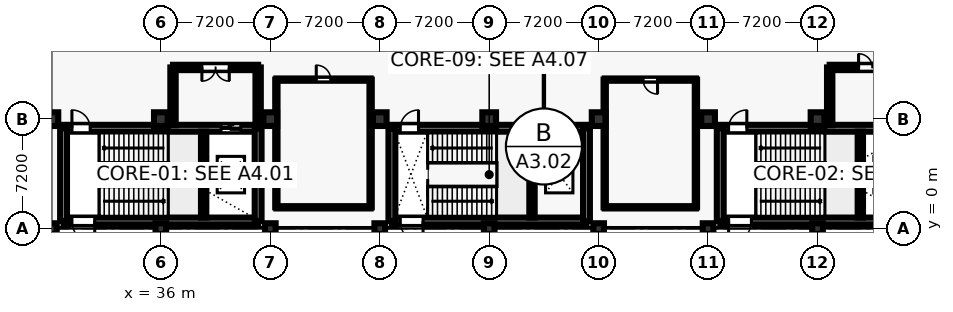
"""IFC4 building model, lengths in metres.
Left out: names, types, materials, properties, quantities, classifications, styles, units other than length and angle.
Written with IfcOpenShell. Run it as: python <this file> out.ifc"""

import sys

from ifc_helpers import new_model, si_unit, direction, frame, frame_2d, origin, origin_2d, place, context, subcontext, project, spatial, rectangle, extrude, element, fill, save


model = new_model("IFC4")
c1 = context("Model", 3, precision=1e-05, world=origin(), true_north=direction((0.0, 1.0)))
c2 = subcontext(c1, "Body", "Model", "MODEL_VIEW")
j1 = project(units=[si_unit("LENGTHUNIT", "METRE"), si_unit("PLANEANGLEUNIT", "RADIAN")], contexts=[c1])
p1 = place(None, origin())
s1 = spatial("IfcSite", under=j1, at=p1, CompositionType="ELEMENT")
p2 = place(p1, origin())
s2 = spatial("IfcBuilding", under=s1, at=p2, CompositionType="ELEMENT")
p3 = place(p2, origin())
s3 = spatial("IfcBuildingStorey", under=s2, at=p3, CompositionType="ELEMENT", Elevation=0.0)
p4 = place(p3, frame((28.8, 0.0, 0.0), z_axis=(0.0, 0.0, 1.0), x_axis=(1.0, 0.0, 0.0)))
e1 = element("IfcColumn", 1, at=p4, inside=s3, PredefinedType="COLUMN", context=c2, shape_type="SweptSolid", body=[
    extrude(rectangle(XDim=0.7, YDim=0.7, at=origin_2d()), origin(), (0.0, 0.0, 1.0), 5.4),
])
p5 = place(p3, frame((28.8, 7.2, 0.0), z_axis=(0.0, 0.0, 1.0), x_axis=(1.0, 0.0, 0.0)))
e2 = element("IfcColumn", 2, at=p5, inside=s3, PredefinedType="COLUMN", context=c2, shape_type="SweptSolid", body=[
    extrude(rectangle(XDim=0.9, YDim=0.9, at=origin_2d()), origin(), (0.0, 0.0, 1.0), 5.4),
])
p6 = place(p3, frame((36.0, 0.0, 0.0), z_axis=(0.0, 0.0, 1.0), x_axis=(1.0, 0.0, 0.0)))
e3 = element("IfcColumn", 3, at=p6, inside=s3, PredefinedType="COLUMN", context=c2, shape_type="SweptSolid", body=[
    extrude(rectangle(XDim=0.7, YDim=0.7, at=origin_2d()), origin(), (0.0, 0.0, 1.0), 5.4),
])
p7 = place(p3, frame((36.0, 7.2, 0.0), z_axis=(0.0, 0.0, 1.0), x_axis=(1.0, 0.0, 0.0)))
e4 = element("IfcColumn", 4, at=p7, inside=s3, PredefinedType="COLUMN", context=c2, shape_type="SweptSolid", body=[
    extrude(rectangle(XDim=0.9, YDim=0.9, at=origin_2d()), origin(), (0.0, 0.0, 1.0), 5.4),
])
p8 = place(p3, frame((43.2, 0.0, 0.0), z_axis=(0.0, 0.0, 1.0), x_axis=(1.0, 0.0, 0.0)))
e5 = element("IfcColumn", 5, at=p8, inside=s3, PredefinedType="COLUMN", context=c2, shape_type="SweptSolid", body=[
    extrude(rectangle(XDim=0.7, YDim=0.7, at=origin_2d()), origin(), (0.0, 0.0, 1.0), 5.4),
])
p9 = place(p3, frame((43.2, 7.2, 0.0), z_axis=(0.0, 0.0, 1.0), x_axis=(1.0, 0.0, 0.0)))
e6 = element("IfcColumn", 6, at=p9, inside=s3, PredefinedType="COLUMN", context=c2, shape_type="SweptSolid", body=[
    extrude(rectangle(XDim=0.9, YDim=0.9, at=origin_2d()), origin(), (0.0, 0.0, 1.0), 5.4),
])
p10 = place(p3, frame((50.4, 0.0, 0.0), z_axis=(0.0, 0.0, 1.0), x_axis=(1.0, 0.0, 0.0)))
e7 = element("IfcColumn", 7, at=p10, inside=s3, PredefinedType="COLUMN", context=c2, shape_type="SweptSolid", body=[
    extrude(rectangle(XDim=0.7, YDim=0.7, at=origin_2d()), origin(), (0.0, 0.0, 1.0), 5.4),
])
p11 = place(p3, frame((50.4, 7.2, 0.0), z_axis=(0.0, 0.0, 1.0), x_axis=(1.0, 0.0, 0.0)))
e8 = element("IfcColumn", 8, at=p11, inside=s3, PredefinedType="COLUMN", context=c2, shape_type="SweptSolid", body=[
    extrude(rectangle(XDim=0.9, YDim=0.9, at=origin_2d()), origin(), (0.0, 0.0, 1.0), 5.4),
])
p12 = place(p3, frame((57.6, 0.0, 0.0), z_axis=(0.0, 0.0, 1.0), x_axis=(1.0, 0.0, 0.0)))
e9 = element("IfcColumn", 9, at=p12, inside=s3, PredefinedType="COLUMN", context=c2, shape_type="SweptSolid", body=[
    extrude(rectangle(XDim=0.7, YDim=0.7, at=origin_2d()), origin(), (0.0, 0.0, 1.0), 5.4),
])
p13 = place(p3, frame((57.6, 7.2, 0.0), z_axis=(0.0, 0.0, 1.0), x_axis=(1.0, 0.0, 0.0)))
e10 = element("IfcColumn", 10, at=p13, inside=s3, PredefinedType="COLUMN", context=c2, shape_type="SweptSolid", body=[
    extrude(rectangle(XDim=0.9, YDim=0.9, at=origin_2d()), origin(), (0.0, 0.0, 1.0), 5.4),
])
p14 = place(p3, frame((64.8, 0.0, 0.0), z_axis=(0.0, 0.0, 1.0), x_axis=(1.0, 0.0, 0.0)))
e11 = element("IfcColumn", 11, at=p14, inside=s3, PredefinedType="COLUMN", context=c2, shape_type="SweptSolid", body=[
    extrude(rectangle(XDim=0.7, YDim=0.7, at=origin_2d()), origin(), (0.0, 0.0, 1.0), 5.4),
])
p15 = place(p3, frame((64.8, 7.2, 0.0), z_axis=(0.0, 0.0, 1.0), x_axis=(1.0, 0.0, 0.0)))
e12 = element("IfcColumn", 12, at=p15, inside=s3, PredefinedType="COLUMN", context=c2, shape_type="SweptSolid", body=[
    extrude(rectangle(XDim=0.9, YDim=0.9, at=origin_2d()), origin(), (0.0, 0.0, 1.0), 5.4),
])
p16 = place(p3, frame((72.0, 0.0, 0.0), z_axis=(0.0, 0.0, 1.0), x_axis=(1.0, 0.0, 0.0)))
e13 = element("IfcColumn", 13, at=p16, inside=s3, PredefinedType="COLUMN", context=c2, shape_type="SweptSolid", body=[
    extrude(rectangle(XDim=0.7, YDim=0.7, at=origin_2d()), origin(), (0.0, 0.0, 1.0), 5.4),
])
p17 = place(p3, frame((72.0, 7.2, 0.0), z_axis=(0.0, 0.0, 1.0), x_axis=(1.0, 0.0, 0.0)))
e14 = element("IfcColumn", 14, at=p17, inside=s3, PredefinedType="COLUMN", context=c2, shape_type="SweptSolid", body=[
    extrude(rectangle(XDim=0.9, YDim=0.9, at=origin_2d()), origin(), (0.0, 0.0, 1.0), 5.4),
])
p18 = place(p3, frame((79.2, 0.0, 0.0), z_axis=(0.0, 0.0, 1.0), x_axis=(1.0, 0.0, 0.0)))
e15 = element("IfcColumn", 15, at=p18, inside=s3, PredefinedType="COLUMN", context=c2, shape_type="SweptSolid", body=[
    extrude(rectangle(XDim=0.7, YDim=0.7, at=origin_2d()), origin(), (0.0, 0.0, 1.0), 5.4),
])
p19 = place(p3, frame((79.2, 7.2, 0.0), z_axis=(0.0, 0.0, 1.0), x_axis=(1.0, 0.0, 0.0)))
e16 = element("IfcColumn", 16, at=p19, inside=s3, PredefinedType="COLUMN", context=c2, shape_type="SweptSolid", body=[
    extrude(rectangle(XDim=0.9, YDim=0.9, at=origin_2d()), origin(), (0.0, 0.0, 1.0), 5.4),
])
p20 = place(p3, frame((29.6, 0.5, 0.0), z_axis=(0.0, 0.0, 1.0), x_axis=(1.0, 0.0, 0.0)))
e17 = element("IfcWall", 17, at=p20, inside=s3, PredefinedType="SHEAR", context=c2, shape_type="SweptSolid", body=[
    extrude(rectangle(XDim=12.8, YDim=0.45, at=frame_2d((6.4, 0.0))), origin(), (0.0, 0.0, 1.0), 5.06),
])
p21 = place(p20, frame((0.55, 0.0, 0.0)))
e18 = element("IfcOpeningElement", 18, at=p21, cuts=e17, PredefinedType="OPENING", context=c2, shape_type="SweptSolid", body=[
    extrude(rectangle(XDim=1.5, YDim=2.25, at=frame_2d((0.75, 1.125))), frame((0.0, 0.235, 0.0), z_axis=(0.0, -1.0, 0.0), x_axis=(1.0, 0.0, 0.0)), (0.0, 0.0, 1.0), 0.47),
])
p22 = place(p3, frame((29.6, 6.6, 0.0), z_axis=(0.0, 0.0, 1.0), x_axis=(1.0, 0.0, 0.0)))
e19 = element("IfcWall", 19, at=p22, inside=s3, PredefinedType="SHEAR", context=c2, shape_type="SweptSolid", body=[
    extrude(rectangle(XDim=12.8, YDim=0.45, at=frame_2d((6.4, 0.0))), origin(), (0.0, 0.0, 1.0), 5.06),
])
p23 = place(p22, frame((0.55, 0.0, 0.0)))
e20 = element("IfcOpeningElement", 20, at=p23, cuts=e19, PredefinedType="OPENING", context=c2, shape_type="SweptSolid", body=[
    extrude(rectangle(XDim=1.2, YDim=2.25, at=frame_2d((0.6, 1.125))), frame((0.0, 0.235, 0.0), z_axis=(0.0, -1.0, 0.0), x_axis=(1.0, 0.0, 0.0)), (0.0, 0.0, 1.0), 0.47),
])
p24 = place(p22, frame((10.358, 0.0, 0.0)))
e21 = element("IfcOpeningElement", 21, at=p24, cuts=e19, PredefinedType="OPENING", context=c2, shape_type="SweptSolid", body=[
    extrude(rectangle(XDim=1.3, YDim=2.25, at=frame_2d((0.65, 1.125))), frame((0.0, 0.235, 0.0), z_axis=(0.0, -1.0, 0.0), x_axis=(1.0, 0.0, 0.0)), (0.0, 0.0, 1.0), 0.47),
])
for number, where, z_axis, x_axis in (
    (22, (29.6, 0.5, 0.0), (0.0, 0.0, 1.0), (0.0, 1.0, 0.0)),
    (23, (42.4, 0.5, 0.0), (0.0, 0.0, 1.0), (0.0, 1.0, 0.0)),
):
    element("IfcWall", number, at=place(p3, frame(where, z_axis=z_axis, x_axis=x_axis)), inside=s3, PredefinedType="SHEAR", context=c2, shape_type="SweptSolid", body=[
        extrude(rectangle(XDim=6.1, YDim=0.45, at=frame_2d((3.05, 0.0))), origin(), (0.0, 0.0, 1.0), 5.06),
    ])
p25 = place(p3, frame((38.816, 0.725, 0.0), z_axis=(0.0, 0.0, 1.0), x_axis=(0.0, 1.0, 0.0)))
e24 = element("IfcWall", 24, at=p25, inside=s3, PredefinedType="SHEAR", context=c2, shape_type="SweptSolid", body=[
    extrude(rectangle(XDim=5.65, YDim=0.35, at=frame_2d((2.825, 0.0))), origin(), (0.0, 0.0, 1.0), 5.06),
])
p26 = place(p3, frame((72.8, 0.5, 0.0), z_axis=(0.0, 0.0, 1.0), x_axis=(1.0, 0.0, 0.0)))
e25 = element("IfcWall", 25, at=p26, inside=s3, PredefinedType="SHEAR", context=c2, shape_type="SweptSolid", body=[
    extrude(rectangle(XDim=12.8, YDim=0.45, at=frame_2d((6.4, 0.0))), origin(), (0.0, 0.0, 1.0), 5.06),
])
p27 = place(p26, frame((0.55, 0.0, 0.0)))
e26 = element("IfcOpeningElement", 26, at=p27, cuts=e25, PredefinedType="OPENING", context=c2, shape_type="SweptSolid", body=[
    extrude(rectangle(XDim=1.5, YDim=2.25, at=frame_2d((0.75, 1.125))), frame((0.0, 0.235, 0.0), z_axis=(0.0, -1.0, 0.0), x_axis=(1.0, 0.0, 0.0)), (0.0, 0.0, 1.0), 0.47),
])
p28 = place(p3, frame((72.8, 6.6, 0.0), z_axis=(0.0, 0.0, 1.0), x_axis=(1.0, 0.0, 0.0)))
e27 = element("IfcWall", 27, at=p28, inside=s3, PredefinedType="SHEAR", context=c2, shape_type="SweptSolid", body=[
    extrude(rectangle(XDim=12.8, YDim=0.45, at=frame_2d((6.4, 0.0))), origin(), (0.0, 0.0, 1.0), 5.06),
])
p29 = place(p28, frame((0.55, 0.0, 0.0)))
e28 = element("IfcOpeningElement", 28, at=p29, cuts=e27, PredefinedType="OPENING", context=c2, shape_type="SweptSolid", body=[
    extrude(rectangle(XDim=1.2, YDim=2.25, at=frame_2d((0.6, 1.125))), frame((0.0, 0.235, 0.0), z_axis=(0.0, -1.0, 0.0), x_axis=(1.0, 0.0, 0.0)), (0.0, 0.0, 1.0), 0.47),
])
p30 = place(p28, frame((10.358, 0.0, 0.0)))
e29 = element("IfcOpeningElement", 29, at=p30, cuts=e27, PredefinedType="OPENING", context=c2, shape_type="SweptSolid", body=[
    extrude(rectangle(XDim=1.3, YDim=2.25, at=frame_2d((0.65, 1.125))), frame((0.0, 0.235, 0.0), z_axis=(0.0, -1.0, 0.0), x_axis=(1.0, 0.0, 0.0)), (0.0, 0.0, 1.0), 0.47),
])
p31 = place(p3, frame((72.8, 0.5, 0.0), z_axis=(0.0, 0.0, 1.0), x_axis=(0.0, 1.0, 0.0)))
e30 = element("IfcWall", 30, at=p31, inside=s3, PredefinedType="SHEAR", context=c2, shape_type="SweptSolid", body=[
    extrude(rectangle(XDim=6.1, YDim=0.45, at=frame_2d((3.05, 0.0))), origin(), (0.0, 0.0, 1.0), 5.06),
])
p32 = place(p3, frame((82.016, 0.725, 0.0), z_axis=(0.0, 0.0, 1.0), x_axis=(0.0, 1.0, 0.0)))
e31 = element("IfcWall", 31, at=p32, inside=s3, PredefinedType="SHEAR", context=c2, shape_type="SweptSolid", body=[
    extrude(rectangle(XDim=5.65, YDim=0.35, at=frame_2d((2.825, 0.0))), origin(), (0.0, 0.0, 1.0), 5.06),
])
p33 = place(p3, frame((51.2, 0.5, 0.0), z_axis=(0.0, 0.0, 1.0), x_axis=(1.0, 0.0, 0.0)))
e32 = element("IfcWall", 32, at=p33, inside=s3, PredefinedType="SHEAR", context=c2, shape_type="SweptSolid", body=[
    extrude(rectangle(XDim=12.8, YDim=0.45, at=frame_2d((6.4, 0.0))), origin(), (0.0, 0.0, 1.0), 5.06),
])
p34 = place(p33, frame((0.55, 0.0, 0.0)))
e33 = element("IfcOpeningElement", 33, at=p34, cuts=e32, PredefinedType="OPENING", context=c2, shape_type="SweptSolid", body=[
    extrude(rectangle(XDim=1.5, YDim=2.25, at=frame_2d((0.75, 1.125))), frame((0.0, 0.235, 0.0), z_axis=(0.0, -1.0, 0.0), x_axis=(1.0, 0.0, 0.0)), (0.0, 0.0, 1.0), 0.47),
])
p35 = place(p3, frame((51.2, 6.6, 0.0), z_axis=(0.0, 0.0, 1.0), x_axis=(1.0, 0.0, 0.0)))
e34 = element("IfcWall", 34, at=p35, inside=s3, PredefinedType="SHEAR", context=c2, shape_type="SweptSolid", body=[
    extrude(rectangle(XDim=12.8, YDim=0.45, at=frame_2d((6.4, 0.0))), origin(), (0.0, 0.0, 1.0), 5.06),
])
p36 = place(p35, frame((0.55, 0.0, 0.0)))
e35 = element("IfcOpeningElement", 35, at=p36, cuts=e34, PredefinedType="OPENING", context=c2, shape_type="SweptSolid", body=[
    extrude(rectangle(XDim=1.2, YDim=2.25, at=frame_2d((0.6, 1.125))), frame((0.0, 0.235, 0.0), z_axis=(0.0, -1.0, 0.0), x_axis=(1.0, 0.0, 0.0)), (0.0, 0.0, 1.0), 0.47),
])
p37 = place(p35, frame((10.458, 0.0, 0.0)))
e36 = element("IfcOpeningElement", 36, at=p37, cuts=e34, PredefinedType="OPENING", context=c2, shape_type="SweptSolid", body=[
    extrude(rectangle(XDim=1.1, YDim=2.2, at=frame_2d((0.55, 1.1))), frame((0.0, 0.235, 0.0), z_axis=(0.0, -1.0, 0.0), x_axis=(1.0, 0.0, 0.0)), (0.0, 0.0, 1.0), 0.47),
])
for number, where, z_axis, x_axis in (
    (37, (51.2, 0.5, 0.0), (0.0, 0.0, 1.0), (0.0, 1.0, 0.0)),
    (38, (64.0, 0.5, 0.0), (0.0, 0.0, 1.0), (0.0, 1.0, 0.0)),
):
    element("IfcWall", number, at=place(p3, frame(where, z_axis=z_axis, x_axis=x_axis)), inside=s3, PredefinedType="SHEAR", context=c2, shape_type="SweptSolid", body=[
        extrude(rectangle(XDim=6.1, YDim=0.45, at=frame_2d((3.05, 0.0))), origin(), (0.0, 0.0, 1.0), 5.06),
    ])
p38 = place(p3, frame((60.416, 0.725, 0.0), z_axis=(0.0, 0.0, 1.0), x_axis=(0.0, 1.0, 0.0)))
e39 = element("IfcWall", 39, at=p38, inside=s3, PredefinedType="SHEAR", context=c2, shape_type="SweptSolid", body=[
    extrude(rectangle(XDim=5.65, YDim=0.35, at=frame_2d((2.825, 0.0))), origin(), (0.0, 0.0, 1.0), 5.06),
])
p39 = place(p3, frame((42.4, 6.8, 0.0), z_axis=(0.0, 0.0, 1.0), x_axis=(0.0, 1.0, 0.0)))
e40 = element("IfcWall", 40, at=p39, inside=s3, PredefinedType="SHEAR", context=c2, shape_type="SweptSolid", body=[
    extrude(rectangle(XDim=3.8, YDim=0.35, at=frame_2d((1.9, 0.0))), origin(), (0.0, 0.0, 1.0), 4.1),
])
p40 = place(p3, frame((42.4, 10.6, 0.0), z_axis=(0.0, 0.0, 1.0), x_axis=(-1.0, 0.0, 0.0)))
e41 = element("IfcWall", 41, at=p40, inside=s3, PredefinedType="SHEAR", context=c2, shape_type="SweptSolid", body=[
    extrude(rectangle(XDim=5.6, YDim=0.35, at=frame_2d((2.8, 0.0))), origin(), (0.0, 0.0, 1.0), 4.1),
])
p41 = place(p40, frame((1.9, 0.0, 0.0)))
e42 = element("IfcOpeningElement", 42, at=p41, cuts=e41, PredefinedType="OPENING", context=c2, shape_type="SweptSolid", body=[
    extrude(rectangle(XDim=1.8, YDim=2.3, at=frame_2d((0.9, 1.15))), frame((0.0, 0.185, 0.0), z_axis=(0.0, -1.0, 0.0), x_axis=(1.0, 0.0, 0.0)), (0.0, 0.0, 1.0), 0.37),
])
p42 = place(p3, frame((36.8, 10.6, 0.0), z_axis=(0.0, 0.0, 1.0), x_axis=(0.0, -1.0, 0.0)))
e43 = element("IfcWall", 43, at=p42, inside=s3, PredefinedType="SHEAR", context=c2, shape_type="SweptSolid", body=[
    extrude(rectangle(XDim=3.8, YDim=0.35, at=frame_2d((1.9, 0.0))), origin(), (0.0, 0.0, 1.0), 4.1),
])
p43 = place(p3, frame((85.6, 10.6, 0.0), z_axis=(0.0, 0.0, 1.0), x_axis=(-1.0, 0.0, 0.0)))
e44 = element("IfcWall", 44, at=p43, inside=s3, PredefinedType="SHEAR", context=c2, shape_type="SweptSolid", body=[
    extrude(rectangle(XDim=5.6, YDim=0.35, at=frame_2d((2.8, 0.0))), origin(), (0.0, 0.0, 1.0), 4.1),
])
p44 = place(p43, frame((1.9, 0.0, 0.0)))
e45 = element("IfcOpeningElement", 45, at=p44, cuts=e44, PredefinedType="OPENING", context=c2, shape_type="SweptSolid", body=[
    extrude(rectangle(XDim=1.8, YDim=2.3, at=frame_2d((0.9, 1.15))), frame((0.0, 0.185, 0.0), z_axis=(0.0, -1.0, 0.0), x_axis=(1.0, 0.0, 0.0)), (0.0, 0.0, 1.0), 0.37),
])
p45 = place(p3, frame((80.0, 10.6, 0.0), z_axis=(0.0, 0.0, 1.0), x_axis=(0.0, -1.0, 0.0)))
e46 = element("IfcWall", 46, at=p45, inside=s3, PredefinedType="SHEAR", context=c2, shape_type="SweptSolid", body=[
    extrude(rectangle(XDim=3.8, YDim=0.35, at=frame_2d((1.9, 0.0))), origin(), (0.0, 0.0, 1.0), 4.1),
])
p46 = place(p3, frame((43.6, 1.4, 0.0), z_axis=(0.0, 0.0, 1.0), x_axis=(1.0, 0.0, 0.0)))
e47 = element("IfcWall", 47, at=p46, inside=s3, PredefinedType="PARTITIONING", context=c2, shape_type="SweptSolid", body=[
    extrude(rectangle(XDim=6.2, YDim=0.15, at=frame_2d((3.1, 0.0))), origin(), (0.0, 0.0, 1.0), 4.1),
])
p47 = place(p3, frame((49.8, 1.4, 0.0), z_axis=(0.0, 0.0, 1.0), x_axis=(0.0, 1.0, 0.0)))
e48 = element("IfcWall", 48, at=p47, inside=s3, PredefinedType="PARTITIONING", context=c2, shape_type="SweptSolid", body=[
    extrude(rectangle(XDim=8.4, YDim=0.15, at=frame_2d((4.2, 0.0))), origin(), (0.0, 0.0, 1.0), 4.1),
])
p48 = place(p3, frame((49.8, 9.8, 0.0), z_axis=(0.0, 0.0, 1.0), x_axis=(-1.0, 0.0, 0.0)))
e49 = element("IfcWall", 49, at=p48, inside=s3, PredefinedType="PARTITIONING", context=c2, shape_type="SweptSolid", body=[
    extrude(rectangle(XDim=6.2, YDim=0.15, at=frame_2d((3.1, 0.0))), origin(), (0.0, 0.0, 1.0), 4.1),
])
p49 = place(p48, frame((2.625, 0.0, 0.0)))
e50 = element("IfcOpeningElement", 50, at=p49, cuts=e49, PredefinedType="OPENING", context=c2, shape_type="SweptSolid", body=[
    extrude(rectangle(XDim=0.95, YDim=2.15, at=frame_2d((0.475, 1.075))), frame((0.0, 0.085, 0.0), z_axis=(0.0, -1.0, 0.0), x_axis=(1.0, 0.0, 0.0)), (0.0, 0.0, 1.0), 0.17),
])
p50 = place(p3, frame((43.6, 9.8, 0.0), z_axis=(0.0, 0.0, 1.0), x_axis=(0.0, -1.0, 0.0)))
e51 = element("IfcWall", 51, at=p50, inside=s3, PredefinedType="PARTITIONING", context=c2, shape_type="SweptSolid", body=[
    extrude(rectangle(XDim=8.4, YDim=0.15, at=frame_2d((4.2, 0.0))), origin(), (0.0, 0.0, 1.0), 4.1),
])
p51 = place(p3, frame((65.2, 1.4, 0.0), z_axis=(0.0, 0.0, 1.0), x_axis=(1.0, 0.0, 0.0)))
e52 = element("IfcWall", 52, at=p51, inside=s3, PredefinedType="PARTITIONING", context=c2, shape_type="SweptSolid", body=[
    extrude(rectangle(XDim=6.0, YDim=0.15, at=frame_2d((3.0, 0.0))), origin(), (0.0, 0.0, 1.0), 4.1),
])
p52 = place(p3, frame((71.2, 1.4, 0.0), z_axis=(0.0, 0.0, 1.0), x_axis=(0.0, 1.0, 0.0)))
e53 = element("IfcWall", 53, at=p52, inside=s3, PredefinedType="PARTITIONING", context=c2, shape_type="SweptSolid", body=[
    extrude(rectangle(XDim=8.4, YDim=0.15, at=frame_2d((4.2, 0.0))), origin(), (0.0, 0.0, 1.0), 4.1),
])
p53 = place(p3, frame((71.2, 9.8, 0.0), z_axis=(0.0, 0.0, 1.0), x_axis=(-1.0, 0.0, 0.0)))
e54 = element("IfcWall", 54, at=p53, inside=s3, PredefinedType="PARTITIONING", context=c2, shape_type="SweptSolid", body=[
    extrude(rectangle(XDim=6.0, YDim=0.15, at=frame_2d((3.0, 0.0))), origin(), (0.0, 0.0, 1.0), 4.1),
])
p54 = place(p53, frame((2.525, 0.0, 0.0)))
e55 = element("IfcOpeningElement", 55, at=p54, cuts=e54, PredefinedType="OPENING", context=c2, shape_type="SweptSolid", body=[
    extrude(rectangle(XDim=0.95, YDim=2.15, at=frame_2d((0.475, 1.075))), frame((0.0, 0.085, 0.0), z_axis=(0.0, -1.0, 0.0), x_axis=(1.0, 0.0, 0.0)), (0.0, 0.0, 1.0), 0.17),
])
p55 = place(p3, frame((65.2, 9.8, 0.0), z_axis=(0.0, 0.0, 1.0), x_axis=(0.0, -1.0, 0.0)))
e56 = element("IfcWall", 56, at=p55, inside=s3, PredefinedType="PARTITIONING", context=c2, shape_type="SweptSolid", body=[
    extrude(rectangle(XDim=8.4, YDim=0.15, at=frame_2d((4.2, 0.0))), origin(), (0.0, 0.0, 1.0), 4.1),
])
p56 = place(p23, origin())
e57 = element("IfcDoor", 57, at=p56, inside=s3, OperationType="SINGLE_SWING_LEFT", PredefinedType="DOOR", context=c2, shape_type="SweptSolid", body=[
    extrude(rectangle(XDim=1.2, YDim=2.25, at=frame_2d((0.6, 1.125))), frame((0.0, 0.025, 0.0), z_axis=(0.0, -1.0, 0.0), x_axis=(1.0, 0.0, 0.0)), (0.0, 0.0, 1.0), 0.05),
])
fill(e20, e57)
p57 = place(p21, frame((1.5, 0.0, 0.0), z_axis=(0.0, 0.0, 1.0), x_axis=(-1.0, 0.0, 0.0)))
e58 = element("IfcDoor", 58, at=p57, inside=s3, OperationType="SINGLE_SWING_RIGHT", PredefinedType="DOOR", context=c2, shape_type="SweptSolid", body=[
    extrude(rectangle(XDim=1.5, YDim=2.25, at=frame_2d((0.75, 1.125))), frame((0.0, 0.025, 0.0), z_axis=(0.0, -1.0, 0.0), x_axis=(1.0, 0.0, 0.0)), (0.0, 0.0, 1.0), 0.05),
])
fill(e18, e58)
p58 = place(p24, origin())
e59 = element("IfcDoor", 59, at=p58, inside=s3, OperationType="SLIDING_TO_RIGHT", PredefinedType="DOOR", context=c2, shape_type="SweptSolid", body=[
    extrude(rectangle(XDim=1.3, YDim=2.25, at=frame_2d((0.65, 1.125))), frame((0.0, 0.025, 0.0), z_axis=(0.0, -1.0, 0.0), x_axis=(1.0, 0.0, 0.0)), (0.0, 0.0, 1.0), 0.05),
])
fill(e21, e59)
p59 = place(p29, origin())
e60 = element("IfcDoor", 60, at=p59, inside=s3, OperationType="SINGLE_SWING_RIGHT", PredefinedType="DOOR", context=c2, shape_type="SweptSolid", body=[
    extrude(rectangle(XDim=1.2, YDim=2.25, at=frame_2d((0.6, 1.125))), frame((0.0, 0.025, 0.0), z_axis=(0.0, -1.0, 0.0), x_axis=(1.0, 0.0, 0.0)), (0.0, 0.0, 1.0), 0.05),
])
fill(e28, e60)
p60 = place(p27, frame((1.5, 0.0, 0.0), z_axis=(0.0, 0.0, 1.0), x_axis=(-1.0, 0.0, 0.0)))
e61 = element("IfcDoor", 61, at=p60, inside=s3, OperationType="SINGLE_SWING_LEFT", PredefinedType="DOOR", context=c2, shape_type="SweptSolid", body=[
    extrude(rectangle(XDim=1.5, YDim=2.25, at=frame_2d((0.75, 1.125))), frame((0.0, 0.025, 0.0), z_axis=(0.0, -1.0, 0.0), x_axis=(1.0, 0.0, 0.0)), (0.0, 0.0, 1.0), 0.05),
])
fill(e26, e61)
p61 = place(p36, origin())
e62 = element("IfcDoor", 62, at=p61, inside=s3, OperationType="SINGLE_SWING_RIGHT", PredefinedType="DOOR", context=c2, shape_type="SweptSolid", body=[
    extrude(rectangle(XDim=1.2, YDim=2.25, at=frame_2d((0.6, 1.125))), frame((0.0, 0.025, 0.0), z_axis=(0.0, -1.0, 0.0), x_axis=(1.0, 0.0, 0.0)), (0.0, 0.0, 1.0), 0.05),
])
fill(e35, e62)
p62 = place(p34, frame((1.5, 0.0, 0.0), z_axis=(0.0, 0.0, 1.0), x_axis=(-1.0, 0.0, 0.0)))
e63 = element("IfcDoor", 63, at=p62, inside=s3, OperationType="SINGLE_SWING_RIGHT", PredefinedType="DOOR", context=c2, shape_type="SweptSolid", body=[
    extrude(rectangle(XDim=1.5, YDim=2.25, at=frame_2d((0.75, 1.125))), frame((0.0, 0.025, 0.0), z_axis=(0.0, -1.0, 0.0), x_axis=(1.0, 0.0, 0.0)), (0.0, 0.0, 1.0), 0.05),
])
fill(e33, e63)
p63 = place(p37, origin())
e64 = element("IfcDoor", 64, at=p63, inside=s3, OperationType="SLIDING_TO_LEFT", PredefinedType="DOOR", context=c2, shape_type="SweptSolid", body=[
    extrude(rectangle(XDim=1.1, YDim=2.2, at=frame_2d((0.55, 1.1))), frame((0.0, 0.025, 0.0), z_axis=(0.0, -1.0, 0.0), x_axis=(1.0, 0.0, 0.0)), (0.0, 0.0, 1.0), 0.05),
])
fill(e36, e64)
p64 = place(p41, origin())
e65 = element("IfcDoor", 65, at=p64, inside=s3, OperationType="DOUBLE_DOOR_SINGLE_SWING", PredefinedType="DOOR", context=c2, shape_type="SweptSolid", body=[
    extrude(rectangle(XDim=1.8, YDim=2.3, at=frame_2d((0.9, 1.15))), frame((0.0, 0.025, 0.0), z_axis=(0.0, -1.0, 0.0), x_axis=(1.0, 0.0, 0.0)), (0.0, 0.0, 1.0), 0.05),
])
fill(e42, e65)
p65 = place(p44, frame((1.8, 0.0, 0.0), z_axis=(0.0, 0.0, 1.0), x_axis=(-1.0, 0.0, 0.0)))
e66 = element("IfcDoor", 66, at=p65, inside=s3, OperationType="DOUBLE_DOOR_SINGLE_SWING", PredefinedType="DOOR", context=c2, shape_type="SweptSolid", body=[
    extrude(rectangle(XDim=1.8, YDim=2.3, at=frame_2d((0.9, 1.15))), frame((0.0, 0.025, 0.0), z_axis=(0.0, -1.0, 0.0), x_axis=(1.0, 0.0, 0.0)), (0.0, 0.0, 1.0), 0.05),
])
fill(e45, e66)
p66 = place(p49, frame((0.95, 0.0, 0.0), z_axis=(0.0, 0.0, 1.0), x_axis=(-1.0, 0.0, 0.0)))
e67 = element("IfcDoor", 67, at=p66, inside=s3, OperationType="SINGLE_SWING_RIGHT", PredefinedType="DOOR", context=c2, shape_type="SweptSolid", body=[
    extrude(rectangle(XDim=0.95, YDim=2.15, at=frame_2d((0.475, 1.075))), frame((0.0, 0.025, 0.0), z_axis=(0.0, -1.0, 0.0), x_axis=(1.0, 0.0, 0.0)), (0.0, 0.0, 1.0), 0.05),
])
fill(e50, e67)
p67 = place(p54, origin())
e68 = element("IfcDoor", 68, at=p67, inside=s3, OperationType="SINGLE_SWING_LEFT", PredefinedType="DOOR", context=c2, shape_type="SweptSolid", body=[
    extrude(rectangle(XDim=0.95, YDim=2.15, at=frame_2d((0.475, 1.075))), frame((0.0, 0.025, 0.0), z_axis=(0.0, -1.0, 0.0), x_axis=(1.0, 0.0, 0.0)), (0.0, 0.0, 1.0), 0.05),
])
fill(e55, e68)
save(model, sys.argv[1])
